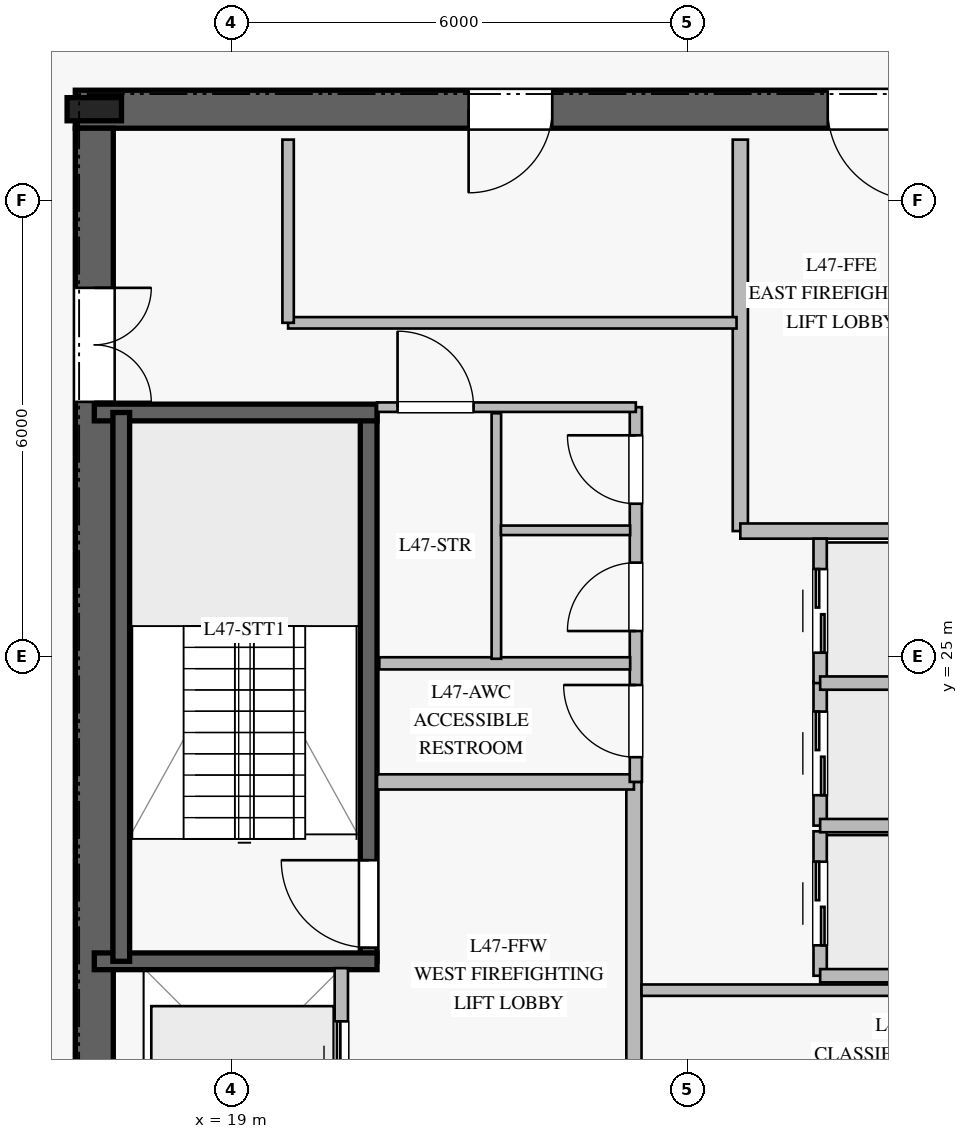
"""IFC4 building model, lengths in metres.
Left out: names, types, materials, properties, quantities, classifications, styles, units other than length and angle.
Written with IfcOpenShell. Run it as: python <this file> out.ifc"""

import sys

from ifc_helpers import new_model, si_unit, direction, frame, frame_2d, origin, origin_2d, place, context, subcontext, project, spatial, rectangle, i_section, extrude, element, fill, save


model = new_model("IFC4")
c1 = context("Model", 3, precision=1e-05, world=origin(), true_north=direction((0.0, 1.0)))
c2 = subcontext(c1, "Body", "Model", "MODEL_VIEW")
j1 = project(units=[si_unit("LENGTHUNIT", "METRE"), si_unit("PLANEANGLEUNIT", "RADIAN")], contexts=[c1])
p1 = place(None, origin())
s1 = spatial("IfcSite", under=j1, at=p1, CompositionType="ELEMENT")
p2 = place(p1, origin())
s2 = spatial("IfcBuilding", under=s1, at=p2, CompositionType="ELEMENT")
p3 = place(p2, frame((0.0, 0.0, 196.8)))
s3 = spatial("IfcBuildingStorey", under=s2, at=p3, CompositionType="ELEMENT", Elevation=196.8)
p4 = place(p3, frame((33.05, 32.2, 0.0), z_axis=(0.0, 0.0, 1.0), x_axis=(-1.0, 0.0, 0.0)))
e1 = element("IfcWall", 1, at=p4, inside=s3, PredefinedType="SHEAR", context=c2, shape_type="SweptSolid", body=[
    extrude(rectangle(XDim=16.1, YDim=0.5, at=frame_2d((8.05, 0.0))), origin(), (0.0, 0.0, 1.0), 3.78),
])
p5 = place(p4, frame((5.0, 0.0, 0.0)))
e2 = element("IfcOpeningElement", 2, at=p5, cuts=e1, PredefinedType="OPENING", context=c2, shape_type="SweptSolid", body=[
    extrude(rectangle(XDim=1.2, YDim=2.25, at=frame_2d((0.6, 1.125))), frame((0.0, 0.26, 0.0), z_axis=(0.0, -1.0, 0.0), x_axis=(1.0, 0.0, 0.0)), (0.0, 0.0, 1.0), 0.52),
])
p6 = place(p4, frame((9.825, 0.0, 0.0)))
e3 = element("IfcOpeningElement", 3, at=p6, cuts=e1, PredefinedType="OPENING", context=c2, shape_type="SweptSolid", body=[
    extrude(rectangle(XDim=1.1, YDim=2.2, at=frame_2d((0.55, 1.1))), frame((0.0, 0.26, 0.0), z_axis=(0.0, -1.0, 0.0), x_axis=(1.0, 0.0, 0.0)), (0.0, 0.0, 1.0), 0.52),
])
p7 = place(p3, frame((17.2, 31.95, 0.0), z_axis=(0.0, 0.0, 1.0), x_axis=(0.0, -1.0, 0.0)))
e4 = element("IfcWall", 4, at=p7, inside=s3, PredefinedType="SHEAR", context=c2, shape_type="SweptSolid", body=[
    extrude(rectangle(XDim=13.9, YDim=0.5, at=frame_2d((6.95, 0.0))), origin(), (0.0, 0.0, 1.0), 3.78),
])
p8 = place(p7, frame((2.1, 0.0, 0.0)))
e5 = element("IfcOpeningElement", 5, at=p8, cuts=e4, PredefinedType="OPENING", context=c2, shape_type="SweptSolid", body=[
    extrude(rectangle(XDim=1.5, YDim=2.2, at=frame_2d((0.75, 1.1))), frame((0.0, 0.26, 0.0), z_axis=(0.0, -1.0, 0.0), x_axis=(1.0, 0.0, 0.0)), (0.0, 0.0, 1.0), 0.52),
])
p9 = place(p3, frame((17.2, 32.2, 0.0), z_axis=(0.0, 0.0, 1.0), x_axis=(1.0, 0.0, 0.0)))
e6 = element("IfcColumn", 6, at=p9, inside=s3, PredefinedType="COLUMN", context=c2, shape_type="SweptSolid", body=[
    extrude(i_section(OverallWidth=0.304, OverallDepth=0.716, WebThickness=0.021, FlangeThickness=0.04, at=origin_2d()), origin(), (0.0, 0.0, 1.0), 4.0),
])
p10 = place(p3, frame((20.81, 20.99, 0.0), z_axis=(0.0, 0.0, 1.0), x_axis=(0.0, 1.0, 0.0)))
e7 = element("IfcWall", 7, at=p10, inside=s3, PredefinedType="SOLIDWALL", context=c2, shape_type="SweptSolid", body=[
    extrude(rectangle(XDim=7.22, YDim=0.22, at=frame_2d((3.61, 0.0))), origin(), (0.0, 0.0, 1.0), 3.78),
])
p11 = place(p10, frame((0.18, 0.0, 0.0)))
e8 = element("IfcOpeningElement", 8, at=p11, cuts=e7, PredefinedType="OPENING", context=c2, shape_type="SweptSolid", body=[
    extrude(rectangle(XDim=1.15, YDim=2.2, at=frame_2d((0.575, 1.1))), frame((0.0, 0.12, 0.0), z_axis=(0.0, -1.0, 0.0), x_axis=(1.0, 0.0, 0.0)), (0.0, 0.0, 1.0), 0.24),
])
for number, where, z_axis, x_axis in (
    (9, (17.2, 20.99, 0.0), (0.0, 0.0, 1.0), (1.0, 0.0, 0.0)),
    (10, (17.2, 28.21, 0.0), (0.0, 0.0, 1.0), (1.0, 0.0, 0.0)),
):
    element("IfcWall", number, at=place(p3, frame(where, z_axis=z_axis, x_axis=x_axis)), inside=s3, PredefinedType="SOLIDWALL", context=c2, shape_type="SweptSolid", body=[
        extrude(rectangle(XDim=3.72, YDim=0.22, at=frame_2d((1.86, 0.0))), origin(), (0.0, 0.0, 1.0), 3.78),
    ])
p12 = place(p3, frame((17.555, 28.21, 0.0), z_axis=(0.0, 0.0, 1.0), x_axis=(0.0, -1.0, 0.0)))
e11 = element("IfcWall", 11, at=p12, inside=s3, PredefinedType="SOLIDWALL", context=c2, shape_type="SweptSolid", body=[
    extrude(rectangle(XDim=7.22, YDim=0.22, at=frame_2d((3.61, 0.0))), origin(), (0.0, 0.0, 1.0), 3.78),
])
p13 = place(p3, frame((24.3, 18.2, 0.0), z_axis=(0.0, 0.0, 1.0), x_axis=(0.0, 1.0, 0.0)))
e12 = element("IfcWall", 12, at=p13, inside=s3, PredefinedType="PARTITIONING", context=c2, shape_type="SweptSolid", body=[
    extrude(rectangle(XDim=5.15, YDim=0.2, at=frame_2d((2.575, 0.0))), origin(), (0.0, 0.0, 1.0), 3.78),
])
p14 = place(p3, frame((20.92, 23.35, 0.0), z_axis=(0.0, 0.0, 1.0), x_axis=(1.0, 0.0, 0.0)))
e13 = element("IfcWall", 13, at=p14, inside=s3, PredefinedType="PARTITIONING", context=c2, shape_type="SweptSolid", body=[
    extrude(rectangle(XDim=3.38, YDim=0.2, at=frame_2d((1.69, 0.0))), origin(), (0.0, 0.0, 1.0), 3.78),
])
p15 = place(p3, frame((25.7, 26.65, 0.0), z_axis=(0.0, 0.0, 1.0), x_axis=(0.0, 1.0, 0.0)))
e14 = element("IfcWall", 14, at=p15, inside=s3, PredefinedType="PARTITIONING", context=c2, shape_type="SweptSolid", body=[
    extrude(rectangle(XDim=5.15, YDim=0.2, at=frame_2d((2.575, 0.0))), origin(), (0.0, 0.0, 1.0), 3.78),
])
p16 = place(p3, frame((25.7, 26.65, 0.0), z_axis=(0.0, 0.0, 1.0), x_axis=(1.0, 0.0, 0.0)))
e15 = element("IfcWall", 15, at=p16, inside=s3, PredefinedType="PARTITIONING", context=c2, shape_type="SweptSolid", body=[
    extrude(rectangle(XDim=3.38, YDim=0.2, at=frame_2d((1.69, 0.0))), origin(), (0.0, 0.0, 1.0), 3.78),
])
p17 = place(p3, frame((24.325, 23.35, 0.0), z_axis=(0.0, 0.0, 1.0), x_axis=(0.0, 1.0, 0.0)))
e16 = element("IfcWall", 16, at=p17, inside=s3, PredefinedType="PLUMBINGWALL", context=c2, shape_type="SweptSolid", body=[
    extrude(rectangle(XDim=4.93, YDim=0.16, at=frame_2d((2.465, 0.0))), origin(), (0.0, 0.0, 1.0), 3.78),
])
p18 = place(p17, frame((0.325, 0.0, 0.0)))
e17 = element("IfcOpeningElement", 17, at=p18, cuts=e16, PredefinedType="OPENING", context=c2, shape_type="SweptSolid", body=[
    extrude(rectangle(XDim=0.95, YDim=2.1, at=frame_2d((0.475, 1.05))), frame((0.0, 0.09, 0.0), z_axis=(0.0, -1.0, 0.0), x_axis=(1.0, 0.0, 0.0)), (0.0, 0.0, 1.0), 0.18),
])
p19 = place(p17, frame((1.985, 0.0, 0.0)))
e18 = element("IfcOpeningElement", 18, at=p19, cuts=e16, PredefinedType="OPENING", context=c2, shape_type="SweptSolid", body=[
    extrude(rectangle(XDim=0.9, YDim=2.1, at=frame_2d((0.45, 1.05))), frame((0.0, 0.09, 0.0), z_axis=(0.0, -1.0, 0.0), x_axis=(1.0, 0.0, 0.0)), (0.0, 0.0, 1.0), 0.18),
])
p20 = place(p17, frame((3.66, 0.0, 0.0)))
e19 = element("IfcOpeningElement", 19, at=p20, cuts=e16, PredefinedType="OPENING", context=c2, shape_type="SweptSolid", body=[
    extrude(rectangle(XDim=0.9, YDim=2.1, at=frame_2d((0.45, 1.05))), frame((0.0, 0.09, 0.0), z_axis=(0.0, -1.0, 0.0), x_axis=(1.0, 0.0, 0.0)), (0.0, 0.0, 1.0), 0.18),
])
p21 = place(p3, frame((20.92, 28.28, 0.0), z_axis=(0.0, 0.0, 1.0), x_axis=(1.0, 0.0, 0.0)))
e20 = element("IfcWall", 20, at=p21, inside=s3, PredefinedType="PARTITIONING", context=c2, shape_type="SweptSolid", body=[
    extrude(rectangle(XDim=3.405, YDim=0.125, at=frame_2d((1.703, 0.0))), origin(), (0.0, 0.0, 1.0), 3.78),
])
p22 = place(p21, frame((0.27, 0.0, 0.0)))
e21 = element("IfcOpeningElement", 21, at=p22, cuts=e20, PredefinedType="OPENING", context=c2, shape_type="SweptSolid", body=[
    extrude(rectangle(XDim=1.0, YDim=2.15, at=frame_2d((0.5, 1.075))), frame((0.0, 0.073, 0.0), z_axis=(0.0, -1.0, 0.0), x_axis=(1.0, 0.0, 0.0)), (0.0, 0.0, 1.0), 0.145),
])
p23 = place(p3, frame((20.95, 24.91, 0.0), z_axis=(0.0, 0.0, 1.0), x_axis=(1.0, 0.0, 0.0)))
e22 = element("IfcWall", 22, at=p23, inside=s3, PredefinedType="PLUMBINGWALL", context=c2, shape_type="SweptSolid", body=[
    extrude(rectangle(XDim=3.3, YDim=0.16, at=frame_2d((1.65, 0.0))), origin(), (0.0, 0.0, 1.0), 3.78),
])
p24 = place(p3, frame((22.49, 24.97, 0.0), z_axis=(0.0, 0.0, 1.0), x_axis=(0.0, 1.0, 0.0)))
e23 = element("IfcWall", 23, at=p24, inside=s3, PredefinedType="PARTITIONING", context=c2, shape_type="SweptSolid", body=[
    extrude(rectangle(XDim=3.23, YDim=0.125, at=frame_2d((1.615, 0.0))), origin(), (0.0, 0.0, 1.0), 3.78),
])
p25 = place(p3, frame((22.55, 26.66, 0.0), z_axis=(0.0, 0.0, 1.0), x_axis=(1.0, 0.0, 0.0)))
e24 = element("IfcWall", 24, at=p25, inside=s3, PredefinedType="PARTITIONING", context=c2, shape_type="SweptSolid", body=[
    extrude(rectangle(XDim=1.7, YDim=0.125, at=frame_2d((0.85, 0.0))), origin(), (0.0, 0.0, 1.0), 3.78),
])
p26 = place(p3, frame((24.4, 20.61, 0.0), z_axis=(0.0, 0.0, 1.0), x_axis=(1.0, 0.0, 0.0)))
e25 = element("IfcWall", 25, at=p26, inside=s3, PredefinedType="PARTITIONING", context=c2, shape_type="SweptSolid", body=[
    extrude(rectangle(XDim=5.9, YDim=0.15, at=frame_2d((2.95, 0.0))), origin(), (0.0, 0.0, 1.0), 3.78),
])
p27 = place(p3, frame((19.75, 29.39, 0.0), z_axis=(0.0, 0.0, 1.0), x_axis=(1.0, 0.0, 0.0)))
e26 = element("IfcWall", 26, at=p27, inside=s3, PredefinedType="PARTITIONING", context=c2, shape_type="SweptSolid", body=[
    extrude(rectangle(XDim=5.9, YDim=0.15, at=frame_2d((2.95, 0.0))), origin(), (0.0, 0.0, 1.0), 3.78),
])
p28 = place(p3, frame((19.75, 29.39, 0.0), z_axis=(0.0, 0.0, 1.0), x_axis=(0.0, 1.0, 0.0)))
e27 = element("IfcWall", 27, at=p28, inside=s3, PredefinedType="PARTITIONING", context=c2, shape_type="SweptSolid", body=[
    extrude(rectangle(XDim=2.41, YDim=0.15, at=frame_2d((1.205, 0.0))), origin(), (0.0, 0.0, 1.0), 3.78),
])
p29 = place(p3, frame((26.75, 20.8, 0.0), z_axis=(0.0, 0.0, 1.0), x_axis=(0.0, 1.0, 0.0)))
e28 = element("IfcWall", 28, at=p29, inside=s3, PredefinedType="PARTITIONING", context=c2, shape_type="SweptSolid", body=[
    extrude(rectangle(XDim=1.9, YDim=0.175, at=frame_2d((0.95, 0.0))), origin(), (0.0, 0.0, 1.0), 3.78),
])
p30 = place(p29, frame((0.4, 0.0, 0.0)))
e29 = element("IfcOpeningElement", 29, at=p30, cuts=e28, PredefinedType="OPENING", context=c2, shape_type="SweptSolid", body=[
    extrude(rectangle(XDim=1.1, YDim=2.2, at=frame_2d((0.55, 1.1))), frame((0.0, 0.098, 0.0), z_axis=(0.0, -1.0, 0.0), x_axis=(1.0, 0.0, 0.0)), (0.0, 0.0, 1.0), 0.195),
])
p31 = place(p3, frame((26.75, 20.8, 0.0), z_axis=(0.0, 0.0, 1.0), x_axis=(1.0, 0.0, 0.0)))
e30 = element("IfcWall", 30, at=p31, inside=s3, PredefinedType="PARTITIONING", context=c2, shape_type="SweptSolid", body=[
    extrude(rectangle(XDim=2.35, YDim=0.175, at=frame_2d((1.175, 0.0))), origin(), (0.0, 0.0, 1.0), 3.78),
])
p32 = place(p3, frame((26.75, 22.775, 0.0), z_axis=(0.0, 0.0, 1.0), x_axis=(0.0, 1.0, 0.0)))
e31 = element("IfcWall", 31, at=p32, inside=s3, PredefinedType="PARTITIONING", context=c2, shape_type="SweptSolid", body=[
    extrude(rectangle(XDim=1.9, YDim=0.175, at=frame_2d((0.95, 0.0))), origin(), (0.0, 0.0, 1.0), 3.78),
])
p33 = place(p32, frame((0.4, 0.0, 0.0)))
e32 = element("IfcOpeningElement", 32, at=p33, cuts=e31, PredefinedType="OPENING", context=c2, shape_type="SweptSolid", body=[
    extrude(rectangle(XDim=1.1, YDim=2.2, at=frame_2d((0.55, 1.1))), frame((0.0, 0.098, 0.0), z_axis=(0.0, -1.0, 0.0), x_axis=(1.0, 0.0, 0.0)), (0.0, 0.0, 1.0), 0.195),
])
p34 = place(p3, frame((26.75, 22.775, 0.0), z_axis=(0.0, 0.0, 1.0), x_axis=(1.0, 0.0, 0.0)))
e33 = element("IfcWall", 33, at=p34, inside=s3, PredefinedType="PARTITIONING", context=c2, shape_type="SweptSolid", body=[
    extrude(rectangle(XDim=2.35, YDim=0.175, at=frame_2d((1.175, 0.0))), origin(), (0.0, 0.0, 1.0), 3.78),
])
p35 = place(p3, frame((26.75, 24.65, 0.0), z_axis=(0.0, 0.0, 1.0), x_axis=(0.0, 1.0, 0.0)))
e34 = element("IfcWall", 34, at=p35, inside=s3, PredefinedType="PARTITIONING", context=c2, shape_type="SweptSolid", body=[
    extrude(rectangle(XDim=1.9, YDim=0.175, at=frame_2d((0.95, 0.0))), origin(), (0.0, 0.0, 1.0), 3.78),
])
p36 = place(p35, frame((0.4, 0.0, 0.0)))
e35 = element("IfcOpeningElement", 35, at=p36, cuts=e34, PredefinedType="OPENING", context=c2, shape_type="SweptSolid", body=[
    extrude(rectangle(XDim=1.1, YDim=2.2, at=frame_2d((0.55, 1.1))), frame((0.0, 0.098, 0.0), z_axis=(0.0, -1.0, 0.0), x_axis=(1.0, 0.0, 0.0)), (0.0, 0.0, 1.0), 0.195),
])
p37 = place(p3, frame((26.75, 24.65, 0.0), z_axis=(0.0, 0.0, 1.0), x_axis=(1.0, 0.0, 0.0)))
e36 = element("IfcWall", 36, at=p37, inside=s3, PredefinedType="PARTITIONING", context=c2, shape_type="SweptSolid", body=[
    extrude(rectangle(XDim=2.35, YDim=0.175, at=frame_2d((1.175, 0.0))), origin(), (0.0, 0.0, 1.0), 3.78),
])
p38 = place(p3, frame((20.45, 18.3, 0.0), z_axis=(0.0, 0.0, 1.0), x_axis=(0.0, 1.0, 0.0)))
e37 = element("IfcWall", 37, at=p38, inside=s3, PredefinedType="PARTITIONING", context=c2, shape_type="SweptSolid", body=[
    extrude(rectangle(XDim=2.6, YDim=0.175, at=frame_2d((1.3, 0.0))), origin(), (0.0, 0.0, 1.0), 3.78),
])
p39 = place(p38, frame((0.7, 0.0, 0.0)))
e38 = element("IfcOpeningElement", 38, at=p39, cuts=e37, PredefinedType="OPENING", context=c2, shape_type="SweptSolid", body=[
    extrude(rectangle(XDim=1.2, YDim=2.2, at=frame_2d((0.6, 1.1))), frame((0.0, 0.098, 0.0), z_axis=(0.0, -1.0, 0.0), x_axis=(1.0, 0.0, 0.0)), (0.0, 0.0, 1.0), 0.195),
])
p40 = place(p11, origin())
e39 = element("IfcDoor", 39, at=p40, inside=s3, OperationType="SINGLE_SWING_RIGHT", PredefinedType="DOOR", context=c2, shape_type="SweptSolid", body=[
    extrude(rectangle(XDim=1.15, YDim=2.2, at=frame_2d((0.575, 1.1))), frame((0.0, 0.025, 0.0), z_axis=(0.0, -1.0, 0.0), x_axis=(1.0, 0.0, 0.0)), (0.0, 0.0, 1.0), 0.05),
])
fill(e8, e39)
p41 = place(p5, origin())
e40 = element("IfcDoor", 40, at=p41, inside=s3, OperationType="SINGLE_SWING_LEFT", PredefinedType="DOOR", context=c2, shape_type="SweptSolid", body=[
    extrude(rectangle(XDim=1.2, YDim=2.25, at=frame_2d((0.6, 1.125))), frame((0.0, 0.025, 0.0), z_axis=(0.0, -1.0, 0.0), x_axis=(1.0, 0.0, 0.0)), (0.0, 0.0, 1.0), 0.05),
])
fill(e2, e40)
p42 = place(p8, origin())
e41 = element("IfcDoor", 41, at=p42, inside=s3, OperationType="DOUBLE_DOOR_SINGLE_SWING", PredefinedType="DOOR", context=c2, shape_type="SweptSolid", body=[
    extrude(rectangle(XDim=1.5, YDim=2.2, at=frame_2d((0.75, 1.1))), frame((0.0, 0.025, 0.0), z_axis=(0.0, -1.0, 0.0), x_axis=(1.0, 0.0, 0.0)), (0.0, 0.0, 1.0), 0.05),
])
fill(e5, e41)
p43 = place(p18, origin())
e42 = element("IfcDoor", 42, at=p43, inside=s3, OperationType="SINGLE_SWING_RIGHT", PredefinedType="DOOR", context=c2, shape_type="SweptSolid", body=[
    extrude(rectangle(XDim=0.95, YDim=2.1, at=frame_2d((0.475, 1.05))), frame((0.0, 0.025, 0.0), z_axis=(0.0, -1.0, 0.0), x_axis=(1.0, 0.0, 0.0)), (0.0, 0.0, 1.0), 0.05),
])
fill(e17, e42)
p44 = place(p19, origin())
e43 = element("IfcDoor", 43, at=p44, inside=s3, OperationType="SINGLE_SWING_LEFT", PredefinedType="DOOR", context=c2, shape_type="SweptSolid", body=[
    extrude(rectangle(XDim=0.9, YDim=2.1, at=frame_2d((0.45, 1.05))), frame((0.0, 0.025, 0.0), z_axis=(0.0, -1.0, 0.0), x_axis=(1.0, 0.0, 0.0)), (0.0, 0.0, 1.0), 0.05),
])
fill(e18, e43)
p45 = place(p20, origin())
e44 = element("IfcDoor", 44, at=p45, inside=s3, OperationType="SINGLE_SWING_RIGHT", PredefinedType="DOOR", context=c2, shape_type="SweptSolid", body=[
    extrude(rectangle(XDim=0.9, YDim=2.1, at=frame_2d((0.45, 1.05))), frame((0.0, 0.025, 0.0), z_axis=(0.0, -1.0, 0.0), x_axis=(1.0, 0.0, 0.0)), (0.0, 0.0, 1.0), 0.05),
])
fill(e19, e44)
p46 = place(p22, origin())
e45 = element("IfcDoor", 45, at=p46, inside=s3, OperationType="SINGLE_SWING_LEFT", PredefinedType="DOOR", context=c2, shape_type="SweptSolid", body=[
    extrude(rectangle(XDim=1.0, YDim=2.15, at=frame_2d((0.5, 1.075))), frame((0.0, 0.025, 0.0), z_axis=(0.0, -1.0, 0.0), x_axis=(1.0, 0.0, 0.0)), (0.0, 0.0, 1.0), 0.05),
])
fill(e21, e45)
p47 = place(p6, origin())
e46 = element("IfcDoor", 46, at=p47, inside=s3, OperationType="SINGLE_SWING_RIGHT", PredefinedType="DOOR", context=c2, shape_type="SweptSolid", body=[
    extrude(rectangle(XDim=1.1, YDim=2.2, at=frame_2d((0.55, 1.1))), frame((0.0, 0.025, 0.0), z_axis=(0.0, -1.0, 0.0), x_axis=(1.0, 0.0, 0.0)), (0.0, 0.0, 1.0), 0.05),
])
fill(e3, e46)
p48 = place(p30, origin())
e47 = element("IfcDoor", 47, at=p48, inside=s3, OperationType="DOUBLE_DOOR_SLIDING", PredefinedType="DOOR", context=c2, shape_type="SweptSolid", body=[
    extrude(rectangle(XDim=1.1, YDim=2.2, at=frame_2d((0.55, 1.1))), frame((0.0, 0.025, 0.0), z_axis=(0.0, -1.0, 0.0), x_axis=(1.0, 0.0, 0.0)), (0.0, 0.0, 1.0), 0.05),
])
fill(e29, e47)
p49 = place(p33, origin())
e48 = element("IfcDoor", 48, at=p49, inside=s3, OperationType="DOUBLE_DOOR_SLIDING", PredefinedType="DOOR", context=c2, shape_type="SweptSolid", body=[
    extrude(rectangle(XDim=1.1, YDim=2.2, at=frame_2d((0.55, 1.1))), frame((0.0, 0.025, 0.0), z_axis=(0.0, -1.0, 0.0), x_axis=(1.0, 0.0, 0.0)), (0.0, 0.0, 1.0), 0.05),
])
fill(e32, e48)
p50 = place(p36, origin())
e49 = element("IfcDoor", 49, at=p50, inside=s3, OperationType="DOUBLE_DOOR_SLIDING", PredefinedType="DOOR", context=c2, shape_type="SweptSolid", body=[
    extrude(rectangle(XDim=1.1, YDim=2.2, at=frame_2d((0.55, 1.1))), frame((0.0, 0.025, 0.0), z_axis=(0.0, -1.0, 0.0), x_axis=(1.0, 0.0, 0.0)), (0.0, 0.0, 1.0), 0.05),
])
fill(e35, e49)
p51 = place(p39, origin())
e50 = element("IfcDoor", 50, at=p51, inside=s3, OperationType="DOUBLE_DOOR_SLIDING", PredefinedType="DOOR", context=c2, shape_type="SweptSolid", body=[
    extrude(rectangle(XDim=1.2, YDim=2.2, at=frame_2d((0.6, 1.1))), frame((0.0, 0.025, 0.0), z_axis=(0.0, -1.0, 0.0), x_axis=(1.0, 0.0, 0.0)), (0.0, 0.0, 1.0), 0.05),
])
fill(e38, e50)
save(model, sys.argv[1])
